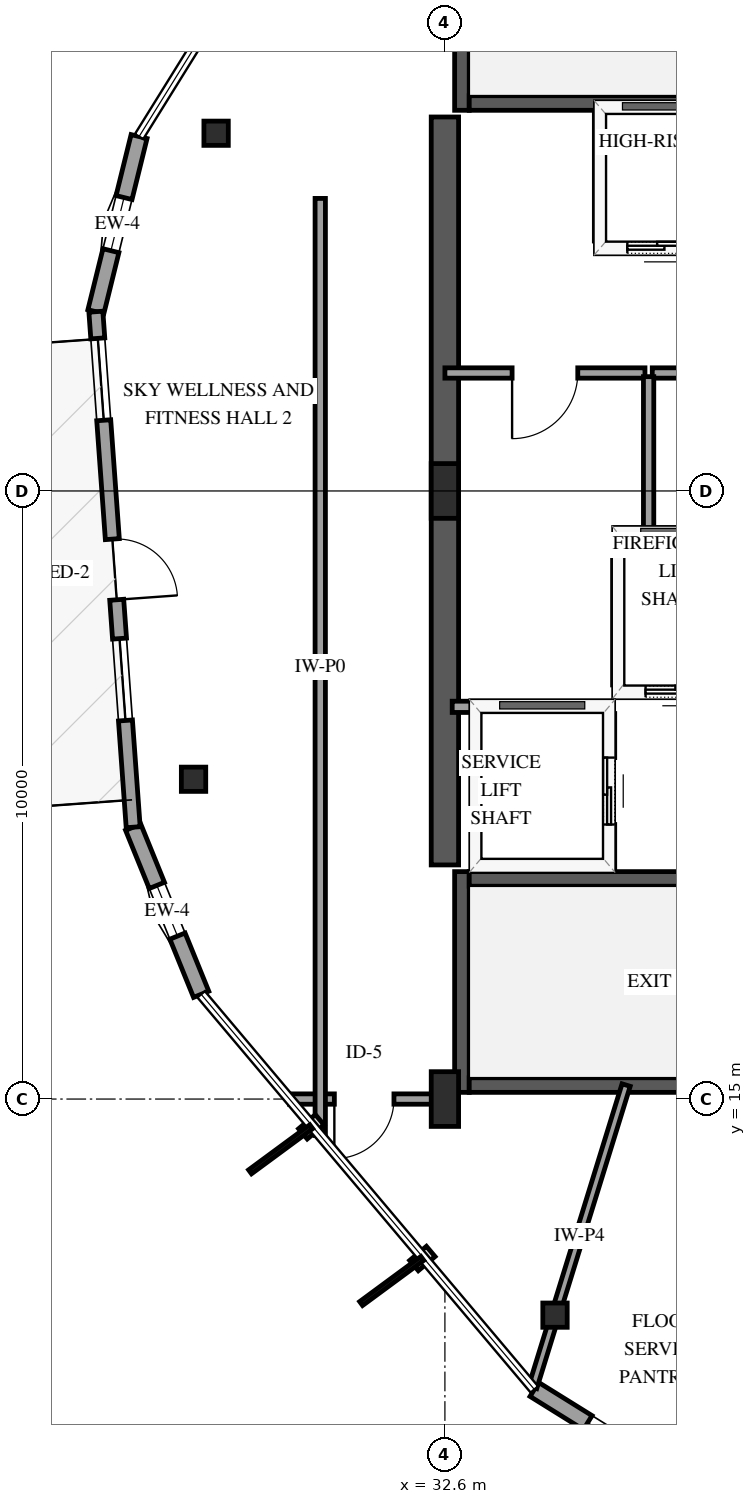
"""IFC4 building model, lengths in metres.
Left out: names, types, materials, properties, quantities, classifications, styles, units other than length and angle.
Written with IfcOpenShell. Run it as: python <this file> out.ifc"""

import sys

from ifc_helpers import new_model, si_unit, direction, frame, frame_2d, origin, origin_2d, place, context, subcontext, project, spatial, rectangle, i_section, extrude, element, fill, save


model = new_model("IFC4")
c1 = context("Model", 3, precision=1e-05, world=origin(), true_north=direction((0.0, 1.0)))
c2 = subcontext(c1, "Body", "Model", "MODEL_VIEW")
j1 = project(units=[si_unit("LENGTHUNIT", "METRE"), si_unit("PLANEANGLEUNIT", "RADIAN")], contexts=[c1])
p1 = place(None, origin())
s1 = spatial("IfcSite", under=j1, at=p1, CompositionType="ELEMENT")
p2 = place(p1, origin())
s2 = spatial("IfcBuilding", under=s1, at=p2, CompositionType="ELEMENT")
p3 = place(p2, frame((0.0, 0.0, 246.25)))
s3 = spatial("IfcBuildingStorey", under=s2, at=p3, CompositionType="ELEMENT", Elevation=246.25)
p4 = place(p3, frame((32.88, 15.11, 0.0), z_axis=(0.0, 0.0, 1.0), x_axis=(0.0, 1.0, 0.0)))
e1 = element("IfcWall", 1, at=p4, inside=s3, PredefinedType="SHEAR", context=c2, shape_type="SweptSolid", body=[
    extrude(rectangle(XDim=3.63, YDim=0.24, at=frame_2d((1.815, 0.0))), origin(), (0.0, 0.0, 1.0), 3.75),
])
for number, where, z_axis, x_axis in (
    (2, (33.0, 15.23, 0.0), (0.0, 0.0, 1.0), (1.0, 0.0, 0.0)),
    (3, (33.0, 18.62, 0.0), (0.0, 0.0, 1.0), (1.0, 0.0, 0.0)),
):
    element("IfcWall", number, at=place(p3, frame(where, z_axis=z_axis, x_axis=x_axis)), inside=s3, PredefinedType="SHEAR", context=c2, shape_type="SweptSolid", body=[
        extrude(rectangle(XDim=8.0, YDim=0.24, at=frame_2d((4.0, 0.0))), origin(), (0.0, 0.0, 1.0), 3.75),
    ])
p5 = place(p3, frame((32.88, 31.26, 0.0), z_axis=(0.0, 0.0, 1.0), x_axis=(0.0, 1.0, 0.0)))
e4 = element("IfcWall", 4, at=p5, inside=s3, PredefinedType="SHEAR", context=c2, shape_type="SweptSolid", body=[
    extrude(rectangle(XDim=3.63, YDim=0.24, at=frame_2d((1.815, 0.0))), origin(), (0.0, 0.0, 1.0), 3.75),
])
p6 = place(p3, frame((33.0, 31.38, 0.0), z_axis=(0.0, 0.0, 1.0), x_axis=(1.0, 0.0, 0.0)))
e5 = element("IfcWall", 5, at=p6, inside=s3, PredefinedType="SHEAR", context=c2, shape_type="SweptSolid", body=[
    extrude(rectangle(XDim=8.0, YDim=0.24, at=frame_2d((4.0, 0.0))), origin(), (0.0, 0.0, 1.0), 3.75),
])
p7 = place(p3, frame((32.6, 18.85, 0.0), z_axis=(0.0, 0.0, 1.0), x_axis=(0.0, 1.0, 0.0)))
e6 = element("IfcWall", 6, at=p7, inside=s3, PredefinedType="SHEAR", context=c2, shape_type="SweptSolid", body=[
    extrude(rectangle(XDim=12.3, YDim=0.45, at=frame_2d((6.15, 0.0))), origin(), (0.0, 0.0, 1.0), 3.75),
])
for number, where, z_axis, x_axis in (
    (7, (32.6, 15.0, 0.0), (0.0, 0.0, 1.0), (1.0, 0.0, 0.0)),
    (8, (32.6, 25.0, 0.0), (0.0, 0.0, 1.0), (1.0, 0.0, 0.0)),
):
    element("IfcColumn", number, at=place(p3, frame(where, z_axis=z_axis, x_axis=x_axis)), inside=s3, PredefinedType="PILASTER", context=c2, shape_type="SweptSolid", body=[
        extrude(rectangle(XDim=0.45, YDim=0.9, at=origin_2d()), origin(), (0.0, 0.0, 1.0), 3.75),
    ])
for number, where, z_axis, x_axis in (
    (9, (28.837, 30.883, 0.0), (0.0, 0.0, 1.0), (1.0, 0.0, 0.0)),
    (10, (28.466, 20.259, 0.0), (0.0, 0.0, 1.0), (1.0, 0.0, 0.0)),
    (11, (34.411, 11.446, 0.0), (0.0, 0.0, 1.0), (1.0, 0.0, 0.0)),
):
    element("IfcColumn", number, at=place(p3, frame(where, z_axis=z_axis, x_axis=x_axis)), inside=s3, PredefinedType="COLUMN", context=c2, shape_type="SweptSolid", body=[
        extrude(i_section(OverallWidth=0.401, OverallDepth=0.399, WebThickness=0.025, FlangeThickness=0.04, FilletRadius=0.038, at=origin_2d()), origin(), (0.0, 0.0, 1.0), 3.75),
    ])
p8 = place(p3, frame((27.571, 30.828, 0.0), z_axis=(0.0, 0.0, 1.0), x_axis=(-0.23949416051, -0.970897804654, 0.0)))
e12 = element("IfcWall", 12, at=p8, inside=s3, PredefinedType="SOLIDWALL", context=c2, shape_type="SweptSolid", body=[
    extrude(rectangle(XDim=2.967, YDim=0.27, at=frame_2d((1.483, 0.0))), origin(), (0.0, 0.0, 1.0), 2.829),
])
p9 = place(p8, frame((1.033, 0.0, 0.75)))
e13 = element("IfcOpeningElement", 13, at=p9, cuts=e12, PredefinedType="OPENING", context=c2, shape_type="SweptSolid", body=[
    extrude(rectangle(XDim=0.9, YDim=1.5, at=frame_2d((0.45, 0.75))), frame((0.0, 0.145, 0.0), z_axis=(0.0, -1.0, 0.0), x_axis=(1.0, 0.0, 0.0)), (0.0, 0.0, 1.0), 0.29),
])
p10 = place(p3, frame((27.474, 19.47, 0.0), z_axis=(0.0, 0.0, 1.0), x_axis=(0.3768184741, -0.926287124803, 0.0)))
e14 = element("IfcWall", 14, at=p10, inside=s3, PredefinedType="SOLIDWALL", context=c2, shape_type="SweptSolid", body=[
    extrude(rectangle(XDim=2.967, YDim=0.27, at=frame_2d((1.483, 0.0))), origin(), (0.0, 0.0, 1.0), 2.829),
])
p11 = place(p10, frame((1.033, 0.0, 0.75)))
e15 = element("IfcOpeningElement", 15, at=p11, cuts=e14, PredefinedType="OPENING", context=c2, shape_type="SweptSolid", body=[
    extrude(rectangle(XDim=0.9, YDim=1.5, at=frame_2d((0.45, 0.75))), frame((0.0, 0.145, 0.0), z_axis=(0.0, -1.0, 0.0), x_axis=(1.0, 0.0, 0.0)), (0.0, 0.0, 1.0), 0.29),
])
p12 = place(p3, frame((26.86, 27.948, 0.0), z_axis=(0.0, 0.0, 1.0), x_axis=(0.072181914465, -0.997391483433, 0.0)))
e16 = element("IfcWall", 16, at=p12, inside=s3, PredefinedType="SOLIDWALL", context=c2, shape_type="SweptSolid", body=[
    extrude(rectangle(XDim=8.5, YDim=0.23, at=frame_2d((4.25, 0.0))), origin(), (0.0, 0.0, 1.0), 2.829),
])
p13 = place(p12, frame((3.75, 0.0, 0.0)))
e17 = element("IfcOpeningElement", 17, at=p13, cuts=e16, PredefinedType="OPENING", context=c2, shape_type="SweptSolid", body=[
    extrude(rectangle(XDim=1.0, YDim=2.15, at=frame_2d((0.5, 1.075))), frame((0.0, 0.125, 0.0), z_axis=(0.0, -1.0, 0.0), x_axis=(1.0, 0.0, 0.0)), (0.0, 0.0, 1.0), 0.25),
])
p14 = place(p12, frame((0.44, 0.0, 0.72)))
e18 = element("IfcOpeningElement", 18, at=p14, cuts=e16, PredefinedType="OPENING", context=c2, shape_type="SweptSolid", body=[
    extrude(rectangle(XDim=1.35, YDim=1.65, at=frame_2d((0.675, 0.825))), frame((0.0, 0.125, 0.0), z_axis=(0.0, -1.0, 0.0), x_axis=(1.0, 0.0, 0.0)), (0.0, 0.0, 1.0), 0.25),
])
p15 = place(p12, frame((5.39, 0.0, 0.72)))
e19 = element("IfcOpeningElement", 19, at=p15, cuts=e16, PredefinedType="OPENING", context=c2, shape_type="SweptSolid", body=[
    extrude(rectangle(XDim=1.35, YDim=1.65, at=frame_2d((0.675, 0.825))), frame((0.0, 0.125, 0.0), z_axis=(0.0, -1.0, 0.0), x_axis=(1.0, 0.0, 0.0)), (0.0, 0.0, 1.0), 0.25),
])
p16 = place(p3, frame((34.071, 10.225, 0.0), z_axis=(0.0, 0.0, 1.0), x_axis=(0.849350139028, -0.527829841268, 0.0)))
e20 = element("IfcWall", 20, at=p16, inside=s3, PredefinedType="SOLIDWALL", context=c2, shape_type="SweptSolid", body=[
    extrude(rectangle(XDim=2.967, YDim=0.27, at=frame_2d((1.483, 0.0))), origin(), (0.0, 0.0, 1.0), 2.829),
])
p17 = place(p16, frame((1.033, 0.0, 0.75)))
e21 = element("IfcOpeningElement", 21, at=p17, cuts=e20, PredefinedType="OPENING", context=c2, shape_type="SweptSolid", body=[
    extrude(rectangle(XDim=0.9, YDim=1.5, at=frame_2d((0.45, 0.75))), frame((0.0, 0.145, 0.0), z_axis=(0.0, -1.0, 0.0), x_axis=(1.0, 0.0, 0.0)), (0.0, 0.0, 1.0), 0.29),
])
p18 = place(p3, frame((35.45, 21.7, 0.0), z_axis=(0.0, 0.0, 1.0), x_axis=(1.0, 0.0, 0.0)))
e22 = element("IfcWall", 22, at=p18, inside=s3, PredefinedType="SOLIDWALL", context=c2, shape_type="SweptSolid", body=[
    extrude(rectangle(XDim=2.0, YDim=0.185, at=frame_2d((1.0, 0.0))), origin(), (0.0, 0.0, 1.0), 2.824),
])
p19 = place(p18, frame((0.45, 0.0, 0.0)))
e23 = element("IfcOpeningElement", 23, at=p19, cuts=e22, PredefinedType="OPENING", context=c2, shape_type="SweptSolid", body=[
    extrude(rectangle(XDim=1.1, YDim=2.15, at=frame_2d((0.55, 1.075))), frame((0.0, 0.103, 0.0), z_axis=(0.0, -1.0, 0.0), x_axis=(1.0, 0.0, 0.0)), (0.0, 0.0, 1.0), 0.205),
])
p20 = place(p3, frame((35.45, 24.3, 0.0), z_axis=(0.0, 0.0, 1.0), x_axis=(1.0, 0.0, 0.0)))
e24 = element("IfcWall", 24, at=p20, inside=s3, PredefinedType="SOLIDWALL", context=c2, shape_type="SweptSolid", body=[
    extrude(rectangle(XDim=2.0, YDim=0.185, at=frame_2d((1.0, 0.0))), origin(), (0.0, 0.0, 1.0), 3.45),
])
p21 = place(p3, frame((35.45, 21.81, 0.0), z_axis=(0.0, 0.0, 1.0), x_axis=(0.0, 1.0, 0.0)))
e25 = element("IfcWall", 25, at=p21, inside=s3, PredefinedType="SOLIDWALL", context=c2, shape_type="SweptSolid", body=[
    extrude(rectangle(XDim=2.38, YDim=0.185, at=frame_2d((1.19, 0.0))), origin(), (0.0, 0.0, 1.0), 3.45),
])
p22 = place(p3, frame((32.72, 21.45, 0.0), z_axis=(0.0, 0.0, 1.0), x_axis=(1.0, 0.0, 0.0)))
e26 = element("IfcWall", 26, at=p22, inside=s3, PredefinedType="SOLIDWALL", context=c2, shape_type="SweptSolid", body=[
    extrude(rectangle(XDim=2.58, YDim=0.185, at=frame_2d((1.29, 0.0))), origin(), (0.0, 0.0, 1.0), 3.45),
])
p23 = place(p3, frame((35.3, 18.79, 0.0), z_axis=(0.0, 0.0, 1.0), x_axis=(0.0, 1.0, 0.0)))
e27 = element("IfcWall", 27, at=p23, inside=s3, PredefinedType="SOLIDWALL", context=c2, shape_type="SweptSolid", body=[
    extrude(rectangle(XDim=2.55, YDim=0.185, at=frame_2d((1.275, 0.0))), origin(), (0.0, 0.0, 1.0), 3.45),
])
p24 = place(p23, frame((0.725, 0.0, 0.0)))
e28 = element("IfcOpeningElement", 28, at=p24, cuts=e27, PredefinedType="OPENING", context=c2, shape_type="SweptSolid", body=[
    extrude(rectangle(XDim=1.1, YDim=2.15, at=frame_2d((0.55, 1.075))), frame((0.0, 0.103, 0.0), z_axis=(0.0, -1.0, 0.0), x_axis=(1.0, 0.0, 0.0)), (0.0, 0.0, 1.0), 0.205),
])
p25 = place(p3, frame((35.15, 29.0, 0.0), z_axis=(0.0, 0.0, 1.0), x_axis=(1.0, 0.0, 0.0)))
e29 = element("IfcWall", 29, at=p25, inside=s3, PredefinedType="SOLIDWALL", context=c2, shape_type="SweptSolid", body=[
    extrude(rectangle(XDim=2.0, YDim=0.185, at=frame_2d((1.0, 0.0))), origin(), (0.0, 0.0, 1.0), 3.45),
])
p26 = place(p25, frame((0.45, 0.0, 0.0)))
e30 = element("IfcOpeningElement", 30, at=p26, cuts=e29, PredefinedType="OPENING", context=c2, shape_type="SweptSolid", body=[
    extrude(rectangle(XDim=1.1, YDim=2.15, at=frame_2d((0.55, 1.075))), frame((0.0, 0.103, 0.0), z_axis=(0.0, -1.0, 0.0), x_axis=(1.0, 0.0, 0.0)), (0.0, 0.0, 1.0), 0.205),
])
p27 = place(p3, frame((35.15, 29.11, 0.0), z_axis=(0.0, 0.0, 1.0), x_axis=(0.0, 1.0, 0.0)))
e31 = element("IfcWall", 31, at=p27, inside=s3, PredefinedType="SOLIDWALL", context=c2, shape_type="SweptSolid", body=[
    extrude(rectangle(XDim=2.1, YDim=0.185, at=frame_2d((1.05, 0.0))), origin(), (0.0, 0.0, 1.0), 3.45),
])
p28 = place(p3, frame((35.58, 15.23, 0.0), z_axis=(0.0, 0.0, 1.0), x_axis=(-0.2953646639, -0.955384590267, 0.0)))
e32 = element("IfcWall", 32, at=p28, inside=s3, PredefinedType="PARTITIONING", context=c2, shape_type="SweptSolid", body=[
    extrude(rectangle(XDim=5.204, YDim=0.14, at=frame_2d((2.602, 0.0))), origin(), (0.0, 0.0, 1.0), 2.745),
])
p29 = place(p3, frame((41.16, 26.94, 0.0), z_axis=(0.0, 0.0, 1.0), x_axis=(-1.0, 0.0, 0.0)))
e33 = element("IfcWall", 33, at=p29, inside=s3, PredefinedType="PARTITIONING", context=c2, shape_type="SweptSolid", body=[
    extrude(rectangle(XDim=5.15, YDim=0.17, at=frame_2d((2.575, 0.0))), origin(), (0.0, 0.0, 1.0), 3.45),
])
p30 = place(p29, frame((2.035, 0.0, 0.0)))
e34 = element("IfcOpeningElement", 34, at=p30, cuts=e33, PredefinedType="OPENING", context=c2, shape_type="SweptSolid", body=[
    extrude(rectangle(XDim=1.08, YDim=2.15, at=frame_2d((0.54, 1.075))), frame((0.0, 0.095, 0.0), z_axis=(0.0, -1.0, 0.0), x_axis=(1.0, 0.0, 0.0)), (0.0, 0.0, 1.0), 0.19),
])
p31 = place(p3, frame((35.89, 26.94, 0.0), z_axis=(0.0, 0.0, 1.0), x_axis=(-1.0, 0.0, 0.0)))
e35 = element("IfcWall", 35, at=p31, inside=s3, PredefinedType="PARTITIONING", context=c2, shape_type="SweptSolid", body=[
    extrude(rectangle(XDim=3.29, YDim=0.17, at=frame_2d((1.645, 0.0))), origin(), (0.0, 0.0, 1.0), 3.45),
])
p32 = place(p31, frame((1.105, 0.0, 0.0)))
e36 = element("IfcOpeningElement", 36, at=p32, cuts=e35, PredefinedType="OPENING", context=c2, shape_type="SweptSolid", body=[
    extrude(rectangle(XDim=1.08, YDim=2.15, at=frame_2d((0.54, 1.075))), frame((0.0, 0.095, 0.0), z_axis=(0.0, -1.0, 0.0), x_axis=(1.0, 0.0, 0.0)), (0.0, 0.0, 1.0), 0.19),
])
p33 = place(p3, frame((35.95, 26.88, 0.0), z_axis=(0.0, 0.0, 1.0), x_axis=(0.0, -1.0, 0.0)))
e37 = element("IfcWall", 37, at=p33, inside=s3, PredefinedType="PARTITIONING", context=c2, shape_type="SweptSolid", body=[
    extrude(rectangle(XDim=2.58, YDim=0.17, at=frame_2d((1.29, 0.0))), origin(), (0.0, 0.0, 1.0), 3.45),
])
p34 = place(p3, frame((32.53, 15.0, 0.0), z_axis=(0.0, 0.0, 1.0), x_axis=(-1.0, 0.0, 0.0)))
e38 = element("IfcWall", 38, at=p34, inside=s3, PredefinedType="PARTITIONING", context=c2, shape_type="SweptSolid", body=[
    extrude(rectangle(XDim=2.486, YDim=0.17, at=frame_2d((1.243, 0.0))), origin(), (0.0, 0.0, 1.0), 3.45),
])
p35 = place(p34, frame((0.768, 0.0, 0.0)))
e39 = element("IfcOpeningElement", 39, at=p35, cuts=e38, PredefinedType="OPENING", context=c2, shape_type="SweptSolid", body=[
    extrude(rectangle(XDim=0.98, YDim=2.15, at=frame_2d((0.49, 1.075))), frame((0.0, 0.095, 0.0), z_axis=(0.0, -1.0, 0.0), x_axis=(1.0, 0.0, 0.0)), (0.0, 0.0, 1.0), 0.19),
])
p36 = place(p3, frame((30.55, 14.4, 0.0), z_axis=(0.0, 0.0, 1.0), x_axis=(0.0, 1.0, 0.0)))
e40 = element("IfcWall", 40, at=p36, inside=s3, PredefinedType="PARTITIONING", context=c2, shape_type="SweptSolid", body=[
    extrude(rectangle(XDim=15.411, YDim=0.17, at=frame_2d((7.706, 0.0))), origin(), (0.0, 0.0, 1.0), 3.45),
])
p37 = place(p9, origin())
e41 = element("IfcWindow", 41, at=p37, inside=s3, PartitioningType="SINGLE_PANEL", PredefinedType="WINDOW", context=c2, shape_type="SweptSolid", body=[
    extrude(rectangle(XDim=0.9, YDim=1.5, at=frame_2d((0.45, 0.75))), frame((0.0, 0.03, 0.0), z_axis=(0.0, -1.0, 0.0), x_axis=(1.0, 0.0, 0.0)), (0.0, 0.0, 1.0), 0.06),
])
fill(e13, e41)
p38 = place(p11, origin())
e42 = element("IfcWindow", 42, at=p38, inside=s3, PartitioningType="SINGLE_PANEL", PredefinedType="WINDOW", context=c2, shape_type="SweptSolid", body=[
    extrude(rectangle(XDim=0.9, YDim=1.5, at=frame_2d((0.45, 0.75))), frame((0.0, 0.03, 0.0), z_axis=(0.0, -1.0, 0.0), x_axis=(1.0, 0.0, 0.0)), (0.0, 0.0, 1.0), 0.06),
])
fill(e15, e42)
p39 = place(p13, origin())
e43 = element("IfcDoor", 43, at=p39, inside=s3, OperationType="SINGLE_SWING_RIGHT", PredefinedType="DOOR", context=c2, shape_type="SweptSolid", body=[
    extrude(rectangle(XDim=1.0, YDim=2.15, at=frame_2d((0.5, 1.075))), frame((0.0, 0.025, 0.0), z_axis=(0.0, -1.0, 0.0), x_axis=(1.0, 0.0, 0.0)), (0.0, 0.0, 1.0), 0.05),
])
fill(e17, e43)
p40 = place(p14, origin())
e44 = element("IfcWindow", 44, at=p40, inside=s3, PartitioningType="SINGLE_PANEL", PredefinedType="WINDOW", context=c2, shape_type="SweptSolid", body=[
    extrude(rectangle(XDim=1.35, YDim=1.65, at=frame_2d((0.675, 0.825))), frame((0.0, 0.03, 0.0), z_axis=(0.0, -1.0, 0.0), x_axis=(1.0, 0.0, 0.0)), (0.0, 0.0, 1.0), 0.06),
])
fill(e18, e44)
p41 = place(p15, origin())
e45 = element("IfcWindow", 45, at=p41, inside=s3, PartitioningType="SINGLE_PANEL", PredefinedType="WINDOW", context=c2, shape_type="SweptSolid", body=[
    extrude(rectangle(XDim=1.35, YDim=1.65, at=frame_2d((0.675, 0.825))), frame((0.0, 0.03, 0.0), z_axis=(0.0, -1.0, 0.0), x_axis=(1.0, 0.0, 0.0)), (0.0, 0.0, 1.0), 0.06),
])
fill(e19, e45)
p42 = place(p17, origin())
e46 = element("IfcWindow", 46, at=p42, inside=s3, PartitioningType="SINGLE_PANEL", PredefinedType="WINDOW", context=c2, shape_type="SweptSolid", body=[
    extrude(rectangle(XDim=0.9, YDim=1.5, at=frame_2d((0.45, 0.75))), frame((0.0, 0.03, 0.0), z_axis=(0.0, -1.0, 0.0), x_axis=(1.0, 0.0, 0.0)), (0.0, 0.0, 1.0), 0.06),
])
fill(e21, e46)
p43 = place(p19, origin())
e47 = element("IfcDoor", 47, at=p43, inside=s3, OperationType="SLIDING_TO_LEFT", PredefinedType="DOOR", context=c2, shape_type="SweptSolid", body=[
    extrude(rectangle(XDim=1.1, YDim=2.15, at=frame_2d((0.55, 1.075))), frame((0.0, 0.025, 0.0), z_axis=(0.0, -1.0, 0.0), x_axis=(1.0, 0.0, 0.0)), (0.0, 0.0, 1.0), 0.05),
])
fill(e23, e47)
p44 = place(p24, origin())
e48 = element("IfcDoor", 48, at=p44, inside=s3, OperationType="SLIDING_TO_LEFT", PredefinedType="DOOR", context=c2, shape_type="SweptSolid", body=[
    extrude(rectangle(XDim=1.1, YDim=2.15, at=frame_2d((0.55, 1.075))), frame((0.0, 0.025, 0.0), z_axis=(0.0, -1.0, 0.0), x_axis=(1.0, 0.0, 0.0)), (0.0, 0.0, 1.0), 0.05),
])
fill(e28, e48)
p45 = place(p26, origin())
e49 = element("IfcDoor", 49, at=p45, inside=s3, OperationType="SLIDING_TO_LEFT", PredefinedType="DOOR", context=c2, shape_type="SweptSolid", body=[
    extrude(rectangle(XDim=1.1, YDim=2.15, at=frame_2d((0.55, 1.075))), frame((0.0, 0.025, 0.0), z_axis=(0.0, -1.0, 0.0), x_axis=(1.0, 0.0, 0.0)), (0.0, 0.0, 1.0), 0.05),
])
fill(e30, e49)
p46 = place(p32, origin())
e50 = element("IfcDoor", 50, at=p46, inside=s3, OperationType="SINGLE_SWING_RIGHT", PredefinedType="DOOR", context=c2, shape_type="SweptSolid", body=[
    extrude(rectangle(XDim=1.08, YDim=2.15, at=frame_2d((0.54, 1.075))), frame((0.0, 0.025, 0.0), z_axis=(0.0, -1.0, 0.0), x_axis=(1.0, 0.0, 0.0)), (0.0, 0.0, 1.0), 0.05),
])
fill(e36, e50)
p47 = place(p35, origin())
e51 = element("IfcDoor", 51, at=p47, inside=s3, OperationType="SINGLE_SWING_RIGHT", PredefinedType="DOOR", context=c2, shape_type="SweptSolid", body=[
    extrude(rectangle(XDim=0.98, YDim=2.15, at=frame_2d((0.49, 1.075))), frame((0.0, 0.025, 0.0), z_axis=(0.0, -1.0, 0.0), x_axis=(1.0, 0.0, 0.0)), (0.0, 0.0, 1.0), 0.05),
])
fill(e39, e51)
save(model, sys.argv[1])
